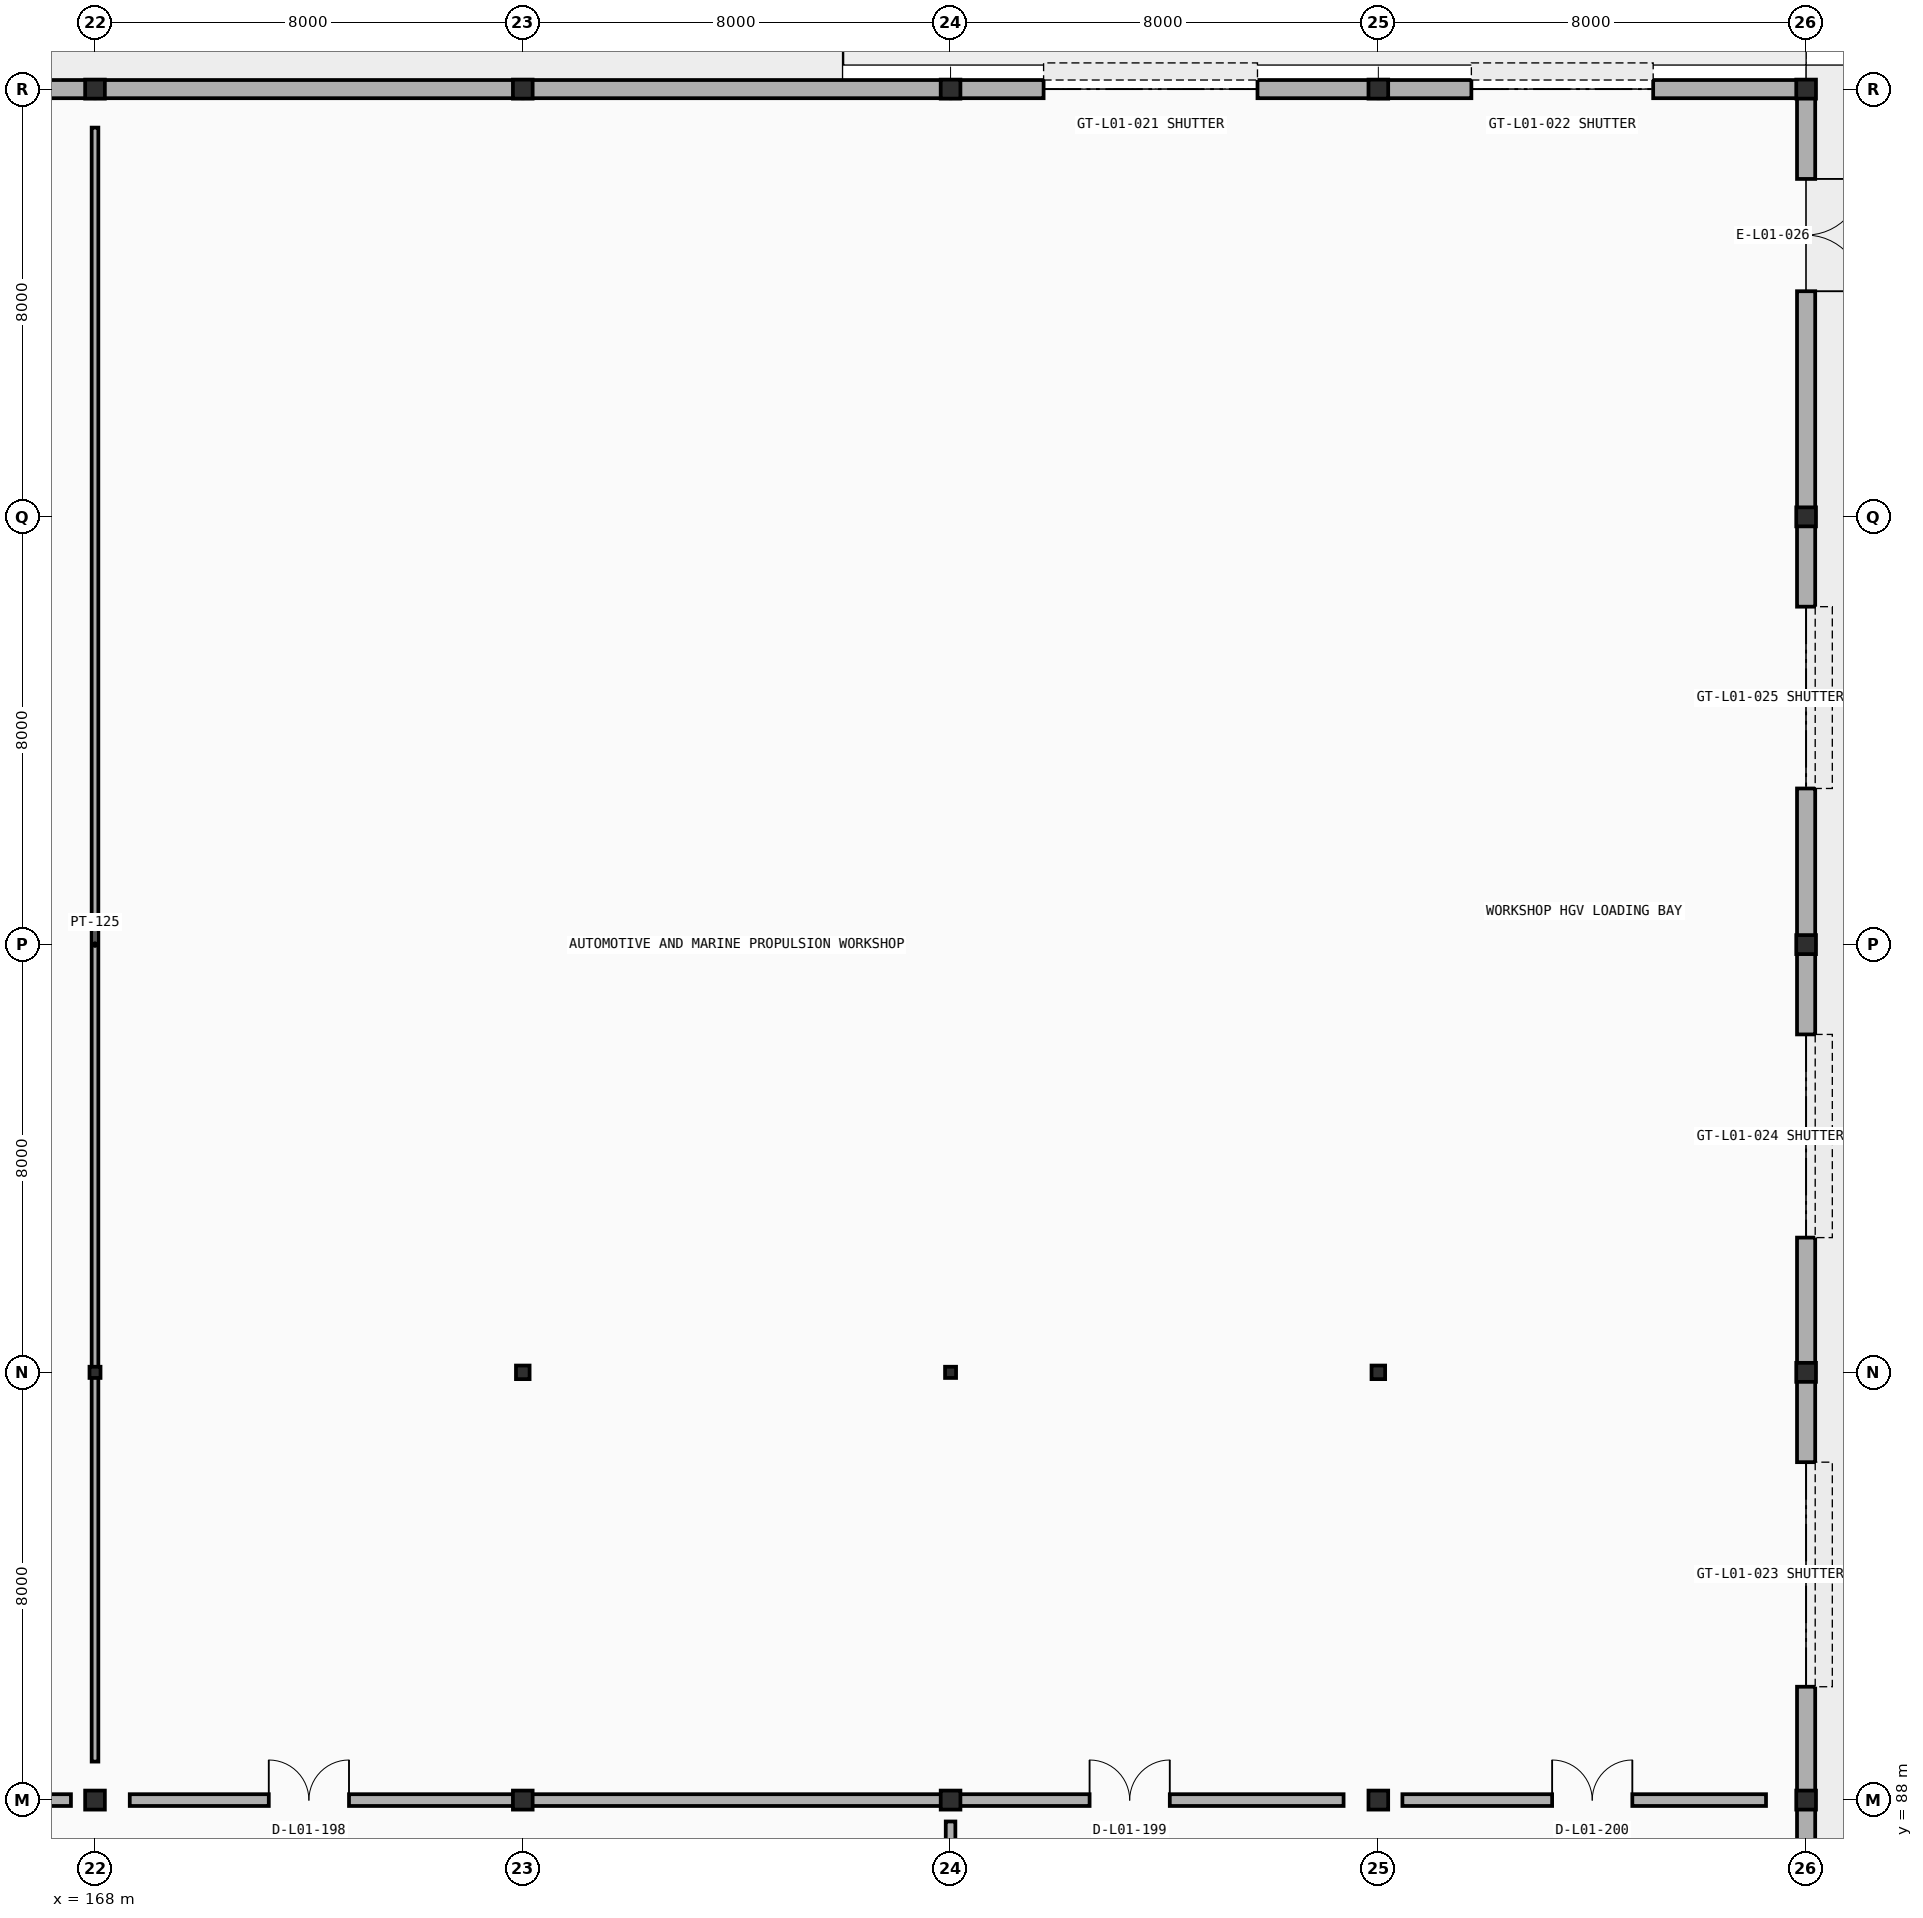
"""IFC4 building model, lengths in metres.
Left out: names, types, materials, properties, quantities, classifications, styles, units other than length and angle.
Written with IfcOpenShell. Run it as: python <this file> out.ifc"""

import sys

from ifc_helpers import new_model, si_unit, direction, frame, frame_2d, origin, origin_2d, place, context, subcontext, project, spatial, rectangle, i_section, extrude, element, fill, save


model = new_model("IFC4")
c1 = context("Model", 3, precision=1e-05, world=origin(), true_north=direction((0.0, 1.0)))
c2 = subcontext(c1, "Body", "Model", "MODEL_VIEW")
j1 = project(units=[si_unit("LENGTHUNIT", "METRE"), si_unit("PLANEANGLEUNIT", "RADIAN")], contexts=[c1])
p1 = place(None, origin())
s1 = spatial("IfcSite", under=j1, at=p1, CompositionType="ELEMENT")
p2 = place(p1, origin())
s2 = spatial("IfcBuilding", under=s1, at=p2, CompositionType="ELEMENT")
p3 = place(p2, origin())
s3 = spatial("IfcBuildingStorey", under=s2, at=p3, CompositionType="ELEMENT", Elevation=0.0)
for number, where, z_axis, x_axis in (
    (1, (168.0, 88.0, 0.0), (0.0, 0.0, 1.0), (1.0, 0.0, 0.0)),
    (2, (176.0, 88.0, 0.0), (0.0, 0.0, 1.0), (1.0, 0.0, 0.0)),
    (3, (184.0, 88.0, 0.0), (0.0, 0.0, 1.0), (1.0, 0.0, 0.0)),
    (4, (192.0, 88.0, 0.0), (0.0, 0.0, 1.0), (1.0, 0.0, 0.0)),
    (5, (200.0, 88.0, 0.0), (0.0, 0.0, 1.0), (1.0, 0.0, 0.0)),
):
    element("IfcColumn", number, at=place(p3, frame(where, z_axis=z_axis, x_axis=x_axis)), inside=s3, PredefinedType="COLUMN", context=c2, shape_type="SweptSolid", body=[
        extrude(i_section(OverallWidth=0.369, OverallDepth=0.356, WebThickness=0.01, FlangeThickness=0.018, FilletRadius=0.015, at=origin_2d()), origin(), (0.0, 0.0, 1.0), 4.8),
    ])
p4 = place(p3, frame((168.0, 96.0, 0.0), z_axis=(0.0, 0.0, 1.0), x_axis=(1.0, 0.0, 0.0)))
e6 = element("IfcColumn", 6, at=p4, inside=s3, PredefinedType="COLUMN", context=c2, shape_type="SweptSolid", body=[
    extrude(i_section(OverallWidth=0.206, OverallDepth=0.21, WebThickness=0.01, FlangeThickness=0.014, FilletRadius=0.01, at=origin_2d()), origin(), (0.0, 0.0, 1.0), 4.8),
])
p5 = place(p3, frame((176.0, 96.0, 0.0), z_axis=(0.0, 0.0, 1.0), x_axis=(1.0, 0.0, 0.0)))
e7 = element("IfcColumn", 7, at=p5, inside=s3, PredefinedType="COLUMN", context=c2, shape_type="SweptSolid", body=[
    extrude(i_section(OverallWidth=0.255, OverallDepth=0.254, WebThickness=0.009, FlangeThickness=0.014, FilletRadius=0.013, at=origin_2d()), origin(), (0.0, 0.0, 1.0), 4.8),
])
p6 = place(p3, frame((184.0, 96.0, 0.0), z_axis=(0.0, 0.0, 1.0), x_axis=(1.0, 0.0, 0.0)))
e8 = element("IfcColumn", 8, at=p6, inside=s3, PredefinedType="COLUMN", context=c2, shape_type="SweptSolid", body=[
    extrude(i_section(OverallWidth=0.206, OverallDepth=0.21, WebThickness=0.01, FlangeThickness=0.014, FilletRadius=0.01, at=origin_2d()), origin(), (0.0, 0.0, 1.0), 4.8),
])
p7 = place(p3, frame((192.0, 96.0, 0.0), z_axis=(0.0, 0.0, 1.0), x_axis=(1.0, 0.0, 0.0)))
e9 = element("IfcColumn", 9, at=p7, inside=s3, PredefinedType="COLUMN", context=c2, shape_type="SweptSolid", body=[
    extrude(i_section(OverallWidth=0.255, OverallDepth=0.254, WebThickness=0.009, FlangeThickness=0.014, FilletRadius=0.013, at=origin_2d()), origin(), (0.0, 0.0, 1.0), 4.8),
])
for number, where, z_axis, x_axis in (
    (10, (200.0, 96.0, 0.0), (0.0, 0.0, 1.0), (1.0, 0.0, 0.0)),
    (11, (200.0, 104.0, 0.0), (0.0, 0.0, 1.0), (1.0, 0.0, 0.0)),
    (12, (200.0, 112.0, 0.0), (0.0, 0.0, 1.0), (1.0, 0.0, 0.0)),
    (13, (168.0, 120.0, 0.0), (0.0, 0.0, 1.0), (1.0, 0.0, 0.0)),
    (14, (176.0, 120.0, 0.0), (0.0, 0.0, 1.0), (1.0, 0.0, 0.0)),
    (15, (184.0, 120.0, 0.0), (0.0, 0.0, 1.0), (1.0, 0.0, 0.0)),
    (16, (192.0, 120.0, 0.0), (0.0, 0.0, 1.0), (1.0, 0.0, 0.0)),
    (17, (200.0, 120.0, 0.0), (0.0, 0.0, 1.0), (1.0, 0.0, 0.0)),
):
    element("IfcColumn", number, at=place(p3, frame(where, z_axis=z_axis, x_axis=x_axis)), inside=s3, PredefinedType="COLUMN", context=c2, shape_type="SweptSolid", body=[
        extrude(i_section(OverallWidth=0.369, OverallDepth=0.356, WebThickness=0.01, FlangeThickness=0.018, FilletRadius=0.015, at=origin_2d()), origin(), (0.0, 0.0, 1.0), 4.8),
    ])
p8 = place(p3, frame((48.0, 120.45, 0.0), z_axis=(0.0, 0.0, 1.0), x_axis=(1.0, 0.0, 0.0)))
e18 = element("IfcWall", 18, at=p8, inside=s3, PredefinedType="PARAPET", context=c2, shape_type="SweptSolid", body=[
    extrude(rectangle(XDim=136.0, YDim=0.3, at=frame_2d((68.0, 0.0))), origin(), (0.0, 0.0, 1.0), 4.65),
])
for number, where, z_axis, x_axis in (
    (19, (160.004, 120.0, 0.0), (0.0, 0.0, 1.0), (1.0, 0.0, 0.0)),
    (20, (168.004, 120.0, 0.0), (0.0, 0.0, 1.0), (1.0, 0.0, 0.0)),
    (21, (176.004, 120.0, 0.0), (0.0, 0.0, 1.0), (1.0, 0.0, 0.0)),
):
    element("IfcWall", number, at=place(p3, frame(where, z_axis=z_axis, x_axis=x_axis)), inside=s3, PredefinedType="STANDARD", context=c2, shape_type="SweptSolid", body=[
        extrude(rectangle(XDim=7.992, YDim=0.34, at=frame_2d((3.996, 0.0))), origin(), (0.0, 0.0, 1.0), 4.12),
    ])
p9 = place(p3, frame((184.004, 120.0, 0.0), z_axis=(0.0, 0.0, 1.0), x_axis=(1.0, 0.0, 0.0)))
e22 = element("IfcWall", 22, at=p9, inside=s3, PredefinedType="STANDARD", context=c2, shape_type="SweptSolid", body=[
    extrude(rectangle(XDim=7.992, YDim=0.34, at=frame_2d((3.996, 0.0))), origin(), (0.0, 0.0, 1.0), 3.85),
])
p10 = place(p9, frame((1.736, 0.0, 0.0)))
e23 = element("IfcOpeningElement", 23, at=p10, cuts=e22, PredefinedType="OPENING", context=c2, shape_type="SweptSolid", body=[
    extrude(rectangle(XDim=4.0, YDim=3.7, at=frame_2d((2.0, 1.85))), frame((0.0, 0.18, 0.0), z_axis=(0.0, -1.0, 0.0), x_axis=(1.0, 0.0, 0.0)), (0.0, 0.0, 1.0), 0.36),
])
p11 = place(p3, frame((192.004, 120.0, 0.0), z_axis=(0.0, 0.0, 1.0), x_axis=(1.0, 0.0, 0.0)))
e24 = element("IfcWall", 24, at=p11, inside=s3, PredefinedType="STANDARD", context=c2, shape_type="SweptSolid", body=[
    extrude(rectangle(XDim=7.992, YDim=0.34, at=frame_2d((3.996, 0.0))), origin(), (0.0, 0.0, 1.0), 3.85),
])
p12 = place(p11, frame((1.736, 0.0, 0.0)))
e25 = element("IfcOpeningElement", 25, at=p12, cuts=e24, PredefinedType="OPENING", context=c2, shape_type="SweptSolid", body=[
    extrude(rectangle(XDim=3.4, YDim=3.5, at=frame_2d((1.7, 1.75))), frame((0.0, 0.18, 0.0), z_axis=(0.0, -1.0, 0.0), x_axis=(1.0, 0.0, 0.0)), (0.0, 0.0, 1.0), 0.36),
])
p13 = place(p3, frame((200.0, 87.996, 0.0), z_axis=(0.0, 0.0, 1.0), x_axis=(0.0, -1.0, 0.0)))
e26 = element("IfcWall", 26, at=p13, inside=s3, PredefinedType="STANDARD", context=c2, shape_type="SweptSolid", body=[
    extrude(rectangle(XDim=7.992, YDim=0.34, at=frame_2d((3.996, 0.0))), origin(), (0.0, 0.0, 1.0), 3.745),
])
p14 = place(p3, frame((200.0, 95.996, 0.0), z_axis=(0.0, 0.0, 1.0), x_axis=(0.0, -1.0, 0.0)))
e27 = element("IfcWall", 27, at=p14, inside=s3, PredefinedType="STANDARD", context=c2, shape_type="SweptSolid", body=[
    extrude(rectangle(XDim=7.992, YDim=0.34, at=frame_2d((3.996, 0.0))), origin(), (0.0, 0.0, 1.0), 4.037),
])
p15 = place(p14, frame((1.676, 0.0, 0.0)))
e28 = element("IfcOpeningElement", 28, at=p15, cuts=e27, PredefinedType="OPENING", context=c2, shape_type="SweptSolid", body=[
    extrude(rectangle(XDim=4.2, YDim=3.8, at=frame_2d((2.1, 1.9))), frame((0.0, 0.18, 0.0), z_axis=(0.0, -1.0, 0.0), x_axis=(1.0, 0.0, 0.0)), (0.0, 0.0, 1.0), 0.36),
])
p16 = place(p3, frame((200.0, 103.996, 0.0), z_axis=(0.0, 0.0, 1.0), x_axis=(0.0, -1.0, 0.0)))
e29 = element("IfcWall", 29, at=p16, inside=s3, PredefinedType="STANDARD", context=c2, shape_type="SweptSolid", body=[
    extrude(rectangle(XDim=7.992, YDim=0.34, at=frame_2d((3.996, 0.0))), origin(), (0.0, 0.0, 1.0), 4.12),
])
p17 = place(p16, frame((1.676, 0.0, 0.0)))
e30 = element("IfcOpeningElement", 30, at=p17, cuts=e29, PredefinedType="OPENING", context=c2, shape_type="SweptSolid", body=[
    extrude(rectangle(XDim=3.8, YDim=3.6, at=frame_2d((1.9, 1.8))), frame((0.0, 0.18, 0.0), z_axis=(0.0, -1.0, 0.0), x_axis=(1.0, 0.0, 0.0)), (0.0, 0.0, 1.0), 0.36),
])
p18 = place(p3, frame((200.0, 111.996, 0.0), z_axis=(0.0, 0.0, 1.0), x_axis=(0.0, -1.0, 0.0)))
e31 = element("IfcWall", 31, at=p18, inside=s3, PredefinedType="STANDARD", context=c2, shape_type="SweptSolid", body=[
    extrude(rectangle(XDim=7.992, YDim=0.34, at=frame_2d((3.996, 0.0))), origin(), (0.0, 0.0, 1.0), 4.12),
])
p19 = place(p18, frame((1.676, 0.0, 0.0)))
e32 = element("IfcOpeningElement", 32, at=p19, cuts=e31, PredefinedType="OPENING", context=c2, shape_type="SweptSolid", body=[
    extrude(rectangle(XDim=3.4, YDim=3.5, at=frame_2d((1.7, 1.75))), frame((0.0, 0.18, 0.0), z_axis=(0.0, -1.0, 0.0), x_axis=(1.0, 0.0, 0.0)), (0.0, 0.0, 1.0), 0.36),
])
p20 = place(p3, frame((200.0, 119.996, 0.0), z_axis=(0.0, 0.0, 1.0), x_axis=(0.0, -1.0, 0.0)))
e33 = element("IfcWall", 33, at=p20, inside=s3, PredefinedType="STANDARD", context=c2, shape_type="SweptSolid", body=[
    extrude(rectangle(XDim=7.992, YDim=0.34, at=frame_2d((3.996, 0.0))), origin(), (0.0, 0.0, 1.0), 4.12),
])
p21 = place(p20, frame((1.676, 0.0, 0.0)))
e34 = element("IfcOpeningElement", 34, at=p21, cuts=e33, PredefinedType="OPENING", context=c2, shape_type="SweptSolid", body=[
    extrude(rectangle(XDim=2.1, YDim=2.4, at=frame_2d((1.05, 1.2))), frame((0.0, 0.18, 0.0), z_axis=(0.0, -1.0, 0.0), x_axis=(1.0, 0.0, 0.0)), (0.0, 0.0, 1.0), 0.36),
])
p22 = place(p3, frame((128.65, 88.0, 0.0), z_axis=(0.0, 0.0, 1.0), x_axis=(1.0, 0.0, 0.0)))
e35 = element("IfcWall", 35, at=p22, inside=s3, PredefinedType="PARTITIONING", context=c2, shape_type="SweptSolid", body=[
    extrude(rectangle(XDim=38.9, YDim=0.22, at=frame_2d((19.45, 0.0))), origin(), (0.0, 0.0, 1.0), 3.795),
])
p23 = place(p22, frame((2.6, 0.0, 0.0)))
e36 = element("IfcOpeningElement", 36, at=p23, cuts=e35, PredefinedType="OPENING", context=c2, shape_type="SweptSolid", body=[
    extrude(rectangle(XDim=1.5, YDim=2.2, at=frame_2d((0.75, 1.1))), frame((0.0, 0.12, 0.0), z_axis=(0.0, -1.0, 0.0), x_axis=(1.0, 0.0, 0.0)), (0.0, 0.0, 1.0), 0.24),
])
p24 = place(p22, frame((34.15, 0.0, 0.0)))
e37 = element("IfcOpeningElement", 37, at=p24, cuts=e35, PredefinedType="OPENING", context=c2, shape_type="SweptSolid", body=[
    extrude(rectangle(XDim=1.5, YDim=2.2, at=frame_2d((0.75, 1.1))), frame((0.0, 0.12, 0.0), z_axis=(0.0, -1.0, 0.0), x_axis=(1.0, 0.0, 0.0)), (0.0, 0.0, 1.0), 0.24),
])
p25 = place(p3, frame((168.0, 88.72, 0.0), z_axis=(0.0, 0.0, 1.0), x_axis=(0.0, 1.0, 0.0)))
e38 = element("IfcWall", 38, at=p25, inside=s3, PredefinedType="PARTITIONING", context=c2, shape_type="SweptSolid", body=[
    extrude(rectangle(XDim=30.56, YDim=0.125, at=frame_2d((15.28, 0.0))), origin(), (0.0, 0.0, 1.0), 3.745),
])
p26 = place(p3, frame((168.65, 88.0, 0.0), z_axis=(0.0, 0.0, 1.0), x_axis=(1.0, 0.0, 0.0)))
e39 = element("IfcWall", 39, at=p26, inside=s3, PredefinedType="PARTITIONING", context=c2, shape_type="SweptSolid", body=[
    extrude(rectangle(XDim=22.7, YDim=0.22, at=frame_2d((11.35, 0.0))), origin(), (0.0, 0.0, 1.0), 3.795),
])
p27 = place(p26, frame((2.6, 0.0, 0.0)))
e40 = element("IfcOpeningElement", 40, at=p27, cuts=e39, PredefinedType="OPENING", context=c2, shape_type="SweptSolid", body=[
    extrude(rectangle(XDim=1.5, YDim=2.2, at=frame_2d((0.75, 1.1))), frame((0.0, 0.12, 0.0), z_axis=(0.0, -1.0, 0.0), x_axis=(1.0, 0.0, 0.0)), (0.0, 0.0, 1.0), 0.24),
])
p28 = place(p26, frame((17.95, 0.0, 0.0)))
e41 = element("IfcOpeningElement", 41, at=p28, cuts=e39, PredefinedType="OPENING", context=c2, shape_type="SweptSolid", body=[
    extrude(rectangle(XDim=1.5, YDim=2.2, at=frame_2d((0.75, 1.1))), frame((0.0, 0.12, 0.0), z_axis=(0.0, -1.0, 0.0), x_axis=(1.0, 0.0, 0.0)), (0.0, 0.0, 1.0), 0.24),
])
p29 = place(p3, frame((192.45, 88.0, 0.0), z_axis=(0.0, 0.0, 1.0), x_axis=(1.0, 0.0, 0.0)))
e42 = element("IfcWall", 42, at=p29, inside=s3, PredefinedType="PARTITIONING", context=c2, shape_type="SweptSolid", body=[
    extrude(rectangle(XDim=6.8, YDim=0.22, at=frame_2d((3.4, 0.0))), origin(), (0.0, 0.0, 1.0), 3.795),
])
p30 = place(p29, frame((2.8, 0.0, 0.0)))
e43 = element("IfcOpeningElement", 43, at=p30, cuts=e42, PredefinedType="OPENING", context=c2, shape_type="SweptSolid", body=[
    extrude(rectangle(XDim=1.5, YDim=2.2, at=frame_2d((0.75, 1.1))), frame((0.0, 0.12, 0.0), z_axis=(0.0, -1.0, 0.0), x_axis=(1.0, 0.0, 0.0)), (0.0, 0.0, 1.0), 0.24),
])
p31 = place(p3, frame((184.0, 85.0, 0.0), z_axis=(0.0, 0.0, 1.0), x_axis=(0.0, 1.0, 0.0)))
e44 = element("IfcWall", 44, at=p31, inside=s3, PredefinedType="PARTITIONING", context=c2, shape_type="SweptSolid", body=[
    extrude(rectangle(XDim=2.6, YDim=0.18, at=frame_2d((1.3, 0.0))), origin(), (0.0, 0.0, 1.0), 3.745),
])
p32 = place(p31, frame((0.39, 0.0, 0.0)))
e45 = element("IfcOpeningElement", 45, at=p32, cuts=e44, PredefinedType="OPENING", context=c2, shape_type="SweptSolid", body=[
    extrude(rectangle(XDim=1.82, YDim=2.25, at=frame_2d((0.91, 1.125))), frame((0.0, 0.1, 0.0), z_axis=(0.0, -1.0, 0.0), x_axis=(1.0, 0.0, 0.0)), (0.0, 0.0, 1.0), 0.2),
])
p33 = place(p10, origin())
e46 = element("IfcDoor", 46, at=p33, inside=s3, OperationType="ROLLINGUP", PredefinedType="GATE", context=c2, shape_type="SweptSolid", body=[
    extrude(rectangle(XDim=4.0, YDim=3.7, at=frame_2d((2.0, 1.85))), frame((0.0, 0.025, 0.0), z_axis=(0.0, -1.0, 0.0), x_axis=(1.0, 0.0, 0.0)), (0.0, 0.0, 1.0), 0.05),
])
fill(e23, e46)
p34 = place(p12, origin())
e47 = element("IfcDoor", 47, at=p34, inside=s3, OperationType="ROLLINGUP", PredefinedType="GATE", context=c2, shape_type="SweptSolid", body=[
    extrude(rectangle(XDim=3.4, YDim=3.5, at=frame_2d((1.7, 1.75))), frame((0.0, 0.025, 0.0), z_axis=(0.0, -1.0, 0.0), x_axis=(1.0, 0.0, 0.0)), (0.0, 0.0, 1.0), 0.05),
])
fill(e25, e47)
p35 = place(p15, origin())
e48 = element("IfcDoor", 48, at=p35, inside=s3, OperationType="ROLLINGUP", PredefinedType="GATE", context=c2, shape_type="SweptSolid", body=[
    extrude(rectangle(XDim=4.2, YDim=3.8, at=frame_2d((2.1, 1.9))), frame((0.0, 0.025, 0.0), z_axis=(0.0, -1.0, 0.0), x_axis=(1.0, 0.0, 0.0)), (0.0, 0.0, 1.0), 0.05),
])
fill(e28, e48)
p36 = place(p17, origin())
e49 = element("IfcDoor", 49, at=p36, inside=s3, OperationType="ROLLINGUP", PredefinedType="GATE", context=c2, shape_type="SweptSolid", body=[
    extrude(rectangle(XDim=3.8, YDim=3.6, at=frame_2d((1.9, 1.8))), frame((0.0, 0.025, 0.0), z_axis=(0.0, -1.0, 0.0), x_axis=(1.0, 0.0, 0.0)), (0.0, 0.0, 1.0), 0.05),
])
fill(e30, e49)
p37 = place(p19, origin())
e50 = element("IfcDoor", 50, at=p37, inside=s3, OperationType="ROLLINGUP", PredefinedType="GATE", context=c2, shape_type="SweptSolid", body=[
    extrude(rectangle(XDim=3.4, YDim=3.5, at=frame_2d((1.7, 1.75))), frame((0.0, 0.025, 0.0), z_axis=(0.0, -1.0, 0.0), x_axis=(1.0, 0.0, 0.0)), (0.0, 0.0, 1.0), 0.05),
])
fill(e32, e50)
p38 = place(p21, origin())
e51 = element("IfcDoor", 51, at=p38, inside=s3, OperationType="DOUBLE_DOOR_SINGLE_SWING", PredefinedType="DOOR", context=c2, shape_type="SweptSolid", body=[
    extrude(rectangle(XDim=2.1, YDim=2.4, at=frame_2d((1.05, 1.2))), frame((0.0, 0.025, 0.0), z_axis=(0.0, -1.0, 0.0), x_axis=(1.0, 0.0, 0.0)), (0.0, 0.0, 1.0), 0.05),
])
fill(e34, e51)
p39 = place(p27, origin())
e52 = element("IfcDoor", 52, at=p39, inside=s3, OperationType="DOUBLE_DOOR_SINGLE_SWING", PredefinedType="DOOR", context=c2, shape_type="SweptSolid", body=[
    extrude(rectangle(XDim=1.5, YDim=2.2, at=frame_2d((0.75, 1.1))), frame((0.0, 0.025, 0.0), z_axis=(0.0, -1.0, 0.0), x_axis=(1.0, 0.0, 0.0)), (0.0, 0.0, 1.0), 0.05),
])
fill(e40, e52)
p40 = place(p28, origin())
e53 = element("IfcDoor", 53, at=p40, inside=s3, OperationType="DOUBLE_DOOR_SINGLE_SWING", PredefinedType="DOOR", context=c2, shape_type="SweptSolid", body=[
    extrude(rectangle(XDim=1.5, YDim=2.2, at=frame_2d((0.75, 1.1))), frame((0.0, 0.025, 0.0), z_axis=(0.0, -1.0, 0.0), x_axis=(1.0, 0.0, 0.0)), (0.0, 0.0, 1.0), 0.05),
])
fill(e41, e53)
p41 = place(p30, origin())
e54 = element("IfcDoor", 54, at=p41, inside=s3, OperationType="DOUBLE_DOOR_SINGLE_SWING", PredefinedType="DOOR", context=c2, shape_type="SweptSolid", body=[
    extrude(rectangle(XDim=1.5, YDim=2.2, at=frame_2d((0.75, 1.1))), frame((0.0, 0.025, 0.0), z_axis=(0.0, -1.0, 0.0), x_axis=(1.0, 0.0, 0.0)), (0.0, 0.0, 1.0), 0.05),
])
fill(e43, e54)
save(model, sys.argv[1])
